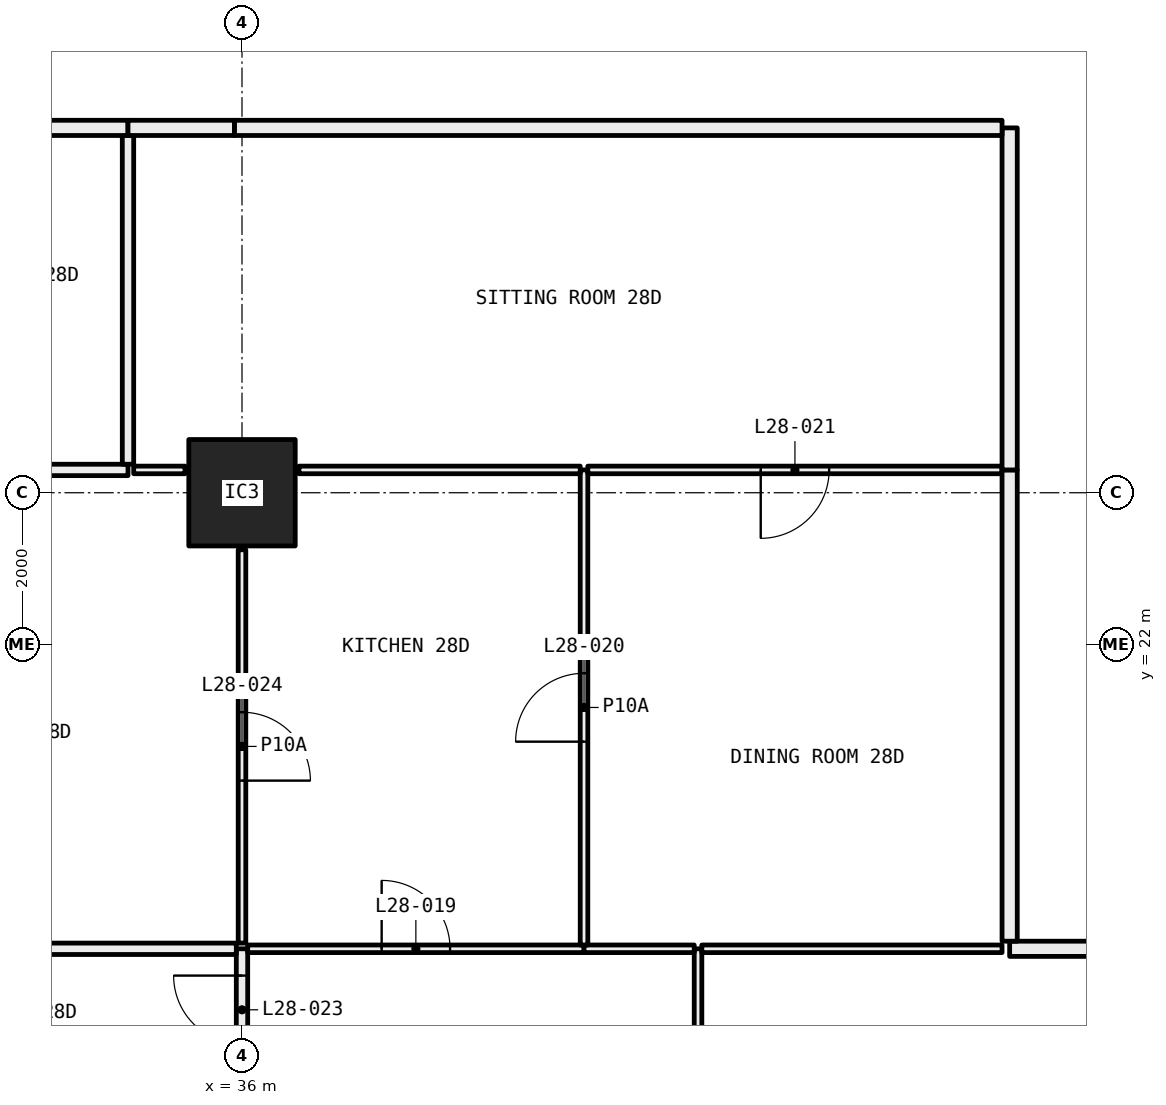
"""IFC4 building model, lengths in metres.
Left out: names, types, materials, properties, quantities, classifications, styles, units other than length and angle.
Written with IfcOpenShell. Run it as: python <this file> out.ifc"""

import sys

from ifc_helpers import new_model, si_unit, direction, frame, frame_2d, origin, origin_2d, place, context, subcontext, project, spatial, rectangle, hollow_rectangle, extrude, element, fill, save


model = new_model("IFC4")
c1 = context("Model", 3, precision=1e-05, world=origin(), true_north=direction((0.0, 1.0)))
c2 = subcontext(c1, "Body", "Model", "MODEL_VIEW")
j1 = project(units=[si_unit("LENGTHUNIT", "METRE"), si_unit("PLANEANGLEUNIT", "RADIAN")], contexts=[c1])
p1 = place(None, origin())
s1 = spatial("IfcSite", under=j1, at=p1, CompositionType="ELEMENT")
p2 = place(p1, origin())
s2 = spatial("IfcBuilding", under=s1, at=p2, CompositionType="ELEMENT")
p3 = place(p2, frame((0.0, 0.0, 110.4)))
s3 = spatial("IfcBuildingStorey", under=s2, at=p3, CompositionType="ELEMENT", Elevation=110.4)
p4 = place(p3, frame((36.0, 24.0, 0.0), z_axis=(0.0, 0.0, 1.0), x_axis=(1.0, 0.0, 0.0)))
e1 = element("IfcColumn", 1, at=p4, inside=s3, PredefinedType="COLUMN", context=c2, shape_type="SweptSolid", body=[
    extrude(hollow_rectangle(XDim=1.4, YDim=1.4, WallThickness=0.06, at=origin_2d()), origin(), (0.0, 0.0, 1.0), 3.05),
])
p5 = place(p3, frame((36.0, 16.395, 0.0), z_axis=(0.0, 0.0, 1.0), x_axis=(0.0, 1.0, 0.0)))
e2 = element("IfcWall", 2, at=p5, inside=s3, PredefinedType="PARTITIONING", context=c2, shape_type="SweptSolid", body=[
    extrude(rectangle(XDim=1.605, YDim=0.15, at=frame_2d((0.802, 0.0))), origin(), (0.0, 0.0, 1.0), 2.45),
])
p6 = place(p5, frame((0.353, 0.0, 0.0)))
e3 = element("IfcOpeningElement", 3, at=p6, cuts=e2, PredefinedType="OPENING", context=c2, shape_type="SweptSolid", body=[
    extrude(rectangle(XDim=0.9, YDim=2.1, at=frame_2d((0.45, 1.05))), frame((0.0, 0.085, 0.0), z_axis=(0.0, -1.0, 0.0), x_axis=(1.0, 0.0, 0.0)), (0.0, 0.0, 1.0), 0.17),
])
p7 = place(p3, frame((35.925, 18.0, 0.0), z_axis=(0.0, 0.0, 1.0), x_axis=(-1.0, 0.0, 0.0)))
e4 = element("IfcWall", 4, at=p7, inside=s3, PredefinedType="PARTITIONING", context=c2, shape_type="SweptSolid", body=[
    extrude(rectangle(XDim=5.825, YDim=0.15, at=frame_2d((2.913, 0.0))), origin(), (0.0, 0.0, 1.0), 2.45),
])
p8 = place(p3, frame((42.0, 12.72, 0.0), z_axis=(0.0, 0.0, 1.0), x_axis=(0.0, 1.0, 0.0)))
e5 = element("IfcWall", 5, at=p8, inside=s3, PredefinedType="PARTITIONING", context=c2, shape_type="SweptSolid", body=[
    extrude(rectangle(XDim=5.28, YDim=0.1, at=frame_2d((2.64, 0.0))), origin(), (0.0, 0.0, 1.0), 3.05),
])
p9 = place(p8, frame((2.19, 0.0, 0.0)))
e6 = element("IfcOpeningElement", 6, at=p9, cuts=e5, PredefinedType="OPENING", context=c2, shape_type="SweptSolid", body=[
    extrude(rectangle(XDim=0.9, YDim=2.1, at=frame_2d((0.45, 1.05))), frame((0.0, 0.06, 0.0), z_axis=(0.0, -1.0, 0.0), x_axis=(1.0, 0.0, 0.0)), (0.0, 0.0, 1.0), 0.12),
])
p10 = place(p3, frame((40.5, 18.0, 0.0), z_axis=(0.0, 0.0, 1.0), x_axis=(-1.0, 0.0, 0.0)))
e7 = element("IfcWall", 7, at=p10, inside=s3, PredefinedType="PARTITIONING", context=c2, shape_type="SweptSolid", body=[
    extrude(rectangle(XDim=4.425, YDim=0.1, at=frame_2d((2.212, 0.0))), origin(), (0.0, 0.0, 1.0), 2.45),
])
p11 = place(p10, frame((1.762, 0.0, 0.0)))
e8 = element("IfcOpeningElement", 8, at=p11, cuts=e7, PredefinedType="OPENING", context=c2, shape_type="SweptSolid", body=[
    extrude(rectangle(XDim=0.9, YDim=2.1, at=frame_2d((0.45, 1.05))), frame((0.0, 0.06, 0.0), z_axis=(0.0, -1.0, 0.0), x_axis=(1.0, 0.0, 0.0)), (0.0, 0.0, 1.0), 0.12),
])
p12 = place(p3, frame((41.95, 18.0, 0.0), z_axis=(0.0, 0.0, 1.0), x_axis=(-1.0, 0.0, 0.0)))
e9 = element("IfcWall", 9, at=p12, inside=s3, PredefinedType="PARTITIONING", context=c2, shape_type="SweptSolid", body=[
    extrude(rectangle(XDim=1.45, YDim=0.1, at=frame_2d((0.725, 0.0))), origin(), (0.0, 0.0, 1.0), 3.05),
])
p13 = place(p3, frame((46.0, 18.0, 0.0), z_axis=(0.0, 0.0, 1.0), x_axis=(-1.0, 0.0, 0.0)))
e10 = element("IfcWall", 10, at=p13, inside=s3, PredefinedType="PARTITIONING", context=c2, shape_type="SweptSolid", body=[
    extrude(rectangle(XDim=3.95, YDim=0.1, at=frame_2d((1.975, 0.0))), origin(), (0.0, 0.0, 1.0), 3.05),
])
p14 = place(p3, frame((48.0, 18.0, 0.0), z_axis=(0.0, 0.0, 1.0), x_axis=(-1.0, 0.0, 0.0)))
e11 = element("IfcWall", 11, at=p14, inside=s3, PredefinedType="PARTITIONING", context=c2, shape_type="SweptSolid", body=[
    extrude(rectangle(XDim=1.9, YDim=0.2, at=frame_2d((0.95, 0.0))), origin(), (0.0, 0.0, 1.0), 3.05),
])
p15 = place(p3, frame((36.0, 18.075, 0.0), z_axis=(0.0, 0.0, 1.0), x_axis=(0.0, 1.0, 0.0)))
e12 = element("IfcWall", 12, at=p15, inside=s3, PredefinedType="PARTITIONING", context=c2, shape_type="SweptSolid", body=[
    extrude(rectangle(XDim=5.175, YDim=0.1, at=frame_2d((2.587, 0.0))), origin(), (0.0, 0.0, 1.0), 2.45),
])
p16 = place(p15, frame((2.137, 0.0, 0.0)))
e13 = element("IfcOpeningElement", 13, at=p16, cuts=e12, PredefinedType="OPENING", context=c2, shape_type="SweptSolid", body=[
    extrude(rectangle(XDim=0.9, YDim=2.1, at=frame_2d((0.45, 1.05))), frame((0.0, 0.06, 0.0), z_axis=(0.0, -1.0, 0.0), x_axis=(1.0, 0.0, 0.0)), (0.0, 0.0, 1.0), 0.12),
])
p17 = place(p3, frame((34.5, 24.3, 0.0), z_axis=(0.0, 0.0, 1.0), x_axis=(-1.0, 0.0, 0.0)))
e14 = element("IfcWall", 14, at=p17, inside=s3, PredefinedType="PARTITIONING", context=c2, shape_type="SweptSolid", body=[
    extrude(rectangle(XDim=4.4, YDim=0.15, at=frame_2d((2.2, 0.0))), origin(), (0.0, 0.0, 1.0), 3.05),
])
p18 = place(p17, frame((1.75, 0.0, 0.0)))
e15 = element("IfcOpeningElement", 15, at=p18, cuts=e14, PredefinedType="OPENING", context=c2, shape_type="SweptSolid", body=[
    extrude(rectangle(XDim=0.9, YDim=2.1, at=frame_2d((0.45, 1.05))), frame((0.0, 0.085, 0.0), z_axis=(0.0, -1.0, 0.0), x_axis=(1.0, 0.0, 0.0)), (0.0, 0.0, 1.0), 0.17),
])
p19 = place(p3, frame((35.25, 24.3, 0.0), z_axis=(0.0, 0.0, 1.0), x_axis=(-1.0, 0.0, 0.0)))
e16 = element("IfcWall", 16, at=p19, inside=s3, PredefinedType="PARTITIONING", context=c2, shape_type="SweptSolid", body=[
    extrude(rectangle(XDim=0.675, YDim=0.1, at=frame_2d((0.337, 0.0))), origin(), (0.0, 0.0, 1.0), 3.05),
])
p20 = place(p3, frame((40.5, 18.05, 0.0), z_axis=(0.0, 0.0, 1.0), x_axis=(0.0, 1.0, 0.0)))
e17 = element("IfcWall", 17, at=p20, inside=s3, PredefinedType="PARTITIONING", context=c2, shape_type="SweptSolid", body=[
    extrude(rectangle(XDim=6.25, YDim=0.1, at=frame_2d((3.125, 0.0))), origin(), (0.0, 0.0, 1.0), 2.45),
])
p21 = place(p20, frame((2.675, 0.0, 0.0)))
e18 = element("IfcOpeningElement", 18, at=p21, cuts=e17, PredefinedType="OPENING", context=c2, shape_type="SweptSolid", body=[
    extrude(rectangle(XDim=0.9, YDim=2.1, at=frame_2d((0.45, 1.05))), frame((0.0, 0.06, 0.0), z_axis=(0.0, -1.0, 0.0), x_axis=(1.0, 0.0, 0.0)), (0.0, 0.0, 1.0), 0.12),
])
p22 = place(p3, frame((40.45, 24.3, 0.0), z_axis=(0.0, 0.0, 1.0), x_axis=(-1.0, 0.0, 0.0)))
e19 = element("IfcWall", 19, at=p22, inside=s3, PredefinedType="PARTITIONING", context=c2, shape_type="SweptSolid", body=[
    extrude(rectangle(XDim=3.7, YDim=0.1, at=frame_2d((1.85, 0.0))), origin(), (0.0, 0.0, 1.0), 3.05),
])
p23 = place(p3, frame((46.0, 24.3, 0.0), z_axis=(0.0, 0.0, 1.0), x_axis=(-1.0, 0.0, 0.0)))
e20 = element("IfcWall", 20, at=p23, inside=s3, PredefinedType="PARTITIONING", context=c2, shape_type="SweptSolid", body=[
    extrude(rectangle(XDim=5.45, YDim=0.1, at=frame_2d((2.725, 0.0))), origin(), (0.0, 0.0, 1.0), 3.05),
])
p24 = place(p23, frame((2.275, 0.0, 0.0)))
e21 = element("IfcOpeningElement", 21, at=p24, cuts=e20, PredefinedType="OPENING", context=c2, shape_type="SweptSolid", body=[
    extrude(rectangle(XDim=0.9, YDim=2.1, at=frame_2d((0.45, 1.05))), frame((0.0, 0.06, 0.0), z_axis=(0.0, -1.0, 0.0), x_axis=(1.0, 0.0, 0.0)), (0.0, 0.0, 1.0), 0.12),
])
p25 = place(p3, frame((46.1, 18.1, 0.0), z_axis=(0.0, 0.0, 1.0), x_axis=(0.0, 1.0, 0.0)))
e22 = element("IfcWall", 22, at=p25, inside=s3, PredefinedType="PARTITIONING", context=c2, shape_type="SweptSolid", body=[
    extrude(rectangle(XDim=6.2, YDim=0.2, at=frame_2d((3.1, 0.0))), origin(), (0.0, 0.0, 1.0), 2.45),
])
p26 = place(p3, frame((34.5, 24.375, 0.0), z_axis=(0.0, 0.0, 1.0), x_axis=(0.0, 1.0, 0.0)))
e23 = element("IfcWall", 23, at=p26, inside=s3, PredefinedType="PARTITIONING", context=c2, shape_type="SweptSolid", body=[
    extrude(rectangle(XDim=4.325, YDim=0.15, at=frame_2d((2.163, 0.0))), origin(), (0.0, 0.0, 1.0), 3.05),
])
p27 = place(p3, frame((34.5, 28.8, 0.0), z_axis=(0.0, 0.0, 1.0), x_axis=(-1.0, 0.0, 0.0)))
e24 = element("IfcWall", 24, at=p27, inside=s3, PredefinedType="PARTITIONING", context=c2, shape_type="SweptSolid", body=[
    extrude(rectangle(XDim=4.4, YDim=0.2, at=frame_2d((2.2, 0.0))), origin(), (0.0, 0.0, 1.0), 3.05),
])
p28 = place(p3, frame((46.1, 24.3, 0.0), z_axis=(0.0, 0.0, 1.0), x_axis=(0.0, 1.0, 0.0)))
e25 = element("IfcWall", 25, at=p28, inside=s3, PredefinedType="PARTITIONING", context=c2, shape_type="SweptSolid", body=[
    extrude(rectangle(XDim=4.5, YDim=0.2, at=frame_2d((2.25, 0.0))), origin(), (0.0, 0.0, 1.0), 3.05),
])
p29 = place(p3, frame((46.0, 28.8, 0.0), z_axis=(0.0, 0.0, 1.0), x_axis=(-1.0, 0.0, 0.0)))
e26 = element("IfcWall", 26, at=p29, inside=s3, PredefinedType="PARTITIONING", context=c2, shape_type="SweptSolid", body=[
    extrude(rectangle(XDim=10.1, YDim=0.2, at=frame_2d((5.05, 0.0))), origin(), (0.0, 0.0, 1.0), 2.45),
])
p30 = place(p3, frame((35.9, 28.8, 0.0), z_axis=(0.0, 0.0, 1.0), x_axis=(-1.0, 0.0, 0.0)))
e27 = element("IfcWall", 27, at=p30, inside=s3, PredefinedType="PARTITIONING", context=c2, shape_type="SweptSolid", body=[
    extrude(rectangle(XDim=1.4, YDim=0.2, at=frame_2d((0.7, 0.0))), origin(), (0.0, 0.0, 1.0), 3.05),
])
p31 = place(p11, frame((0.9, 0.0, 0.0), x_axis=(-1.0, 0.0, 0.0)))
e28 = element("IfcDoor", 28, at=p31, inside=s3, OperationType="SINGLE_SWING_RIGHT", PredefinedType="DOOR", context=c2, shape_type="SweptSolid", body=[
    extrude(rectangle(XDim=0.9, YDim=2.1, at=frame_2d((0.45, 1.05))), frame((0.0, 0.025, 0.0), z_axis=(0.0, -1.0, 0.0), x_axis=(1.0, 0.0, 0.0)), (0.0, 0.0, 1.0), 0.05),
])
fill(e8, e28)
p32 = place(p21, origin())
e29 = element("IfcDoor", 29, at=p32, inside=s3, OperationType="SINGLE_SWING_RIGHT", PredefinedType="DOOR", context=c2, shape_type="SweptSolid", body=[
    extrude(rectangle(XDim=0.9, YDim=2.1, at=frame_2d((0.45, 1.05))), frame((0.0, 0.025, 0.0), z_axis=(0.0, -1.0, 0.0), x_axis=(1.0, 0.0, 0.0)), (0.0, 0.0, 1.0), 0.05),
])
fill(e18, e29)
p33 = place(p24, origin())
e30 = element("IfcDoor", 30, at=p33, inside=s3, OperationType="SINGLE_SWING_LEFT", PredefinedType="DOOR", context=c2, shape_type="SweptSolid", body=[
    extrude(rectangle(XDim=0.9, YDim=2.1, at=frame_2d((0.45, 1.05))), frame((0.0, 0.025, 0.0), z_axis=(0.0, -1.0, 0.0), x_axis=(1.0, 0.0, 0.0)), (0.0, 0.0, 1.0), 0.05),
])
fill(e21, e30)
p34 = place(p6, origin())
e31 = element("IfcDoor", 31, at=p34, inside=s3, OperationType="SINGLE_SWING_LEFT", PredefinedType="DOOR", context=c2, shape_type="SweptSolid", body=[
    extrude(rectangle(XDim=0.9, YDim=2.1, at=frame_2d((0.45, 1.05))), frame((0.0, 0.025, 0.0), z_axis=(0.0, -1.0, 0.0), x_axis=(1.0, 0.0, 0.0)), (0.0, 0.0, 1.0), 0.05),
])
fill(e3, e31)
p35 = place(p16, frame((0.9, 0.0, 0.0), x_axis=(-1.0, 0.0, 0.0)))
e32 = element("IfcDoor", 32, at=p35, inside=s3, OperationType="SINGLE_SWING_LEFT", PredefinedType="DOOR", context=c2, shape_type="SweptSolid", body=[
    extrude(rectangle(XDim=0.9, YDim=2.1, at=frame_2d((0.45, 1.05))), frame((0.0, 0.025, 0.0), z_axis=(0.0, -1.0, 0.0), x_axis=(1.0, 0.0, 0.0)), (0.0, 0.0, 1.0), 0.05),
])
fill(e13, e32)
save(model, sys.argv[1])
